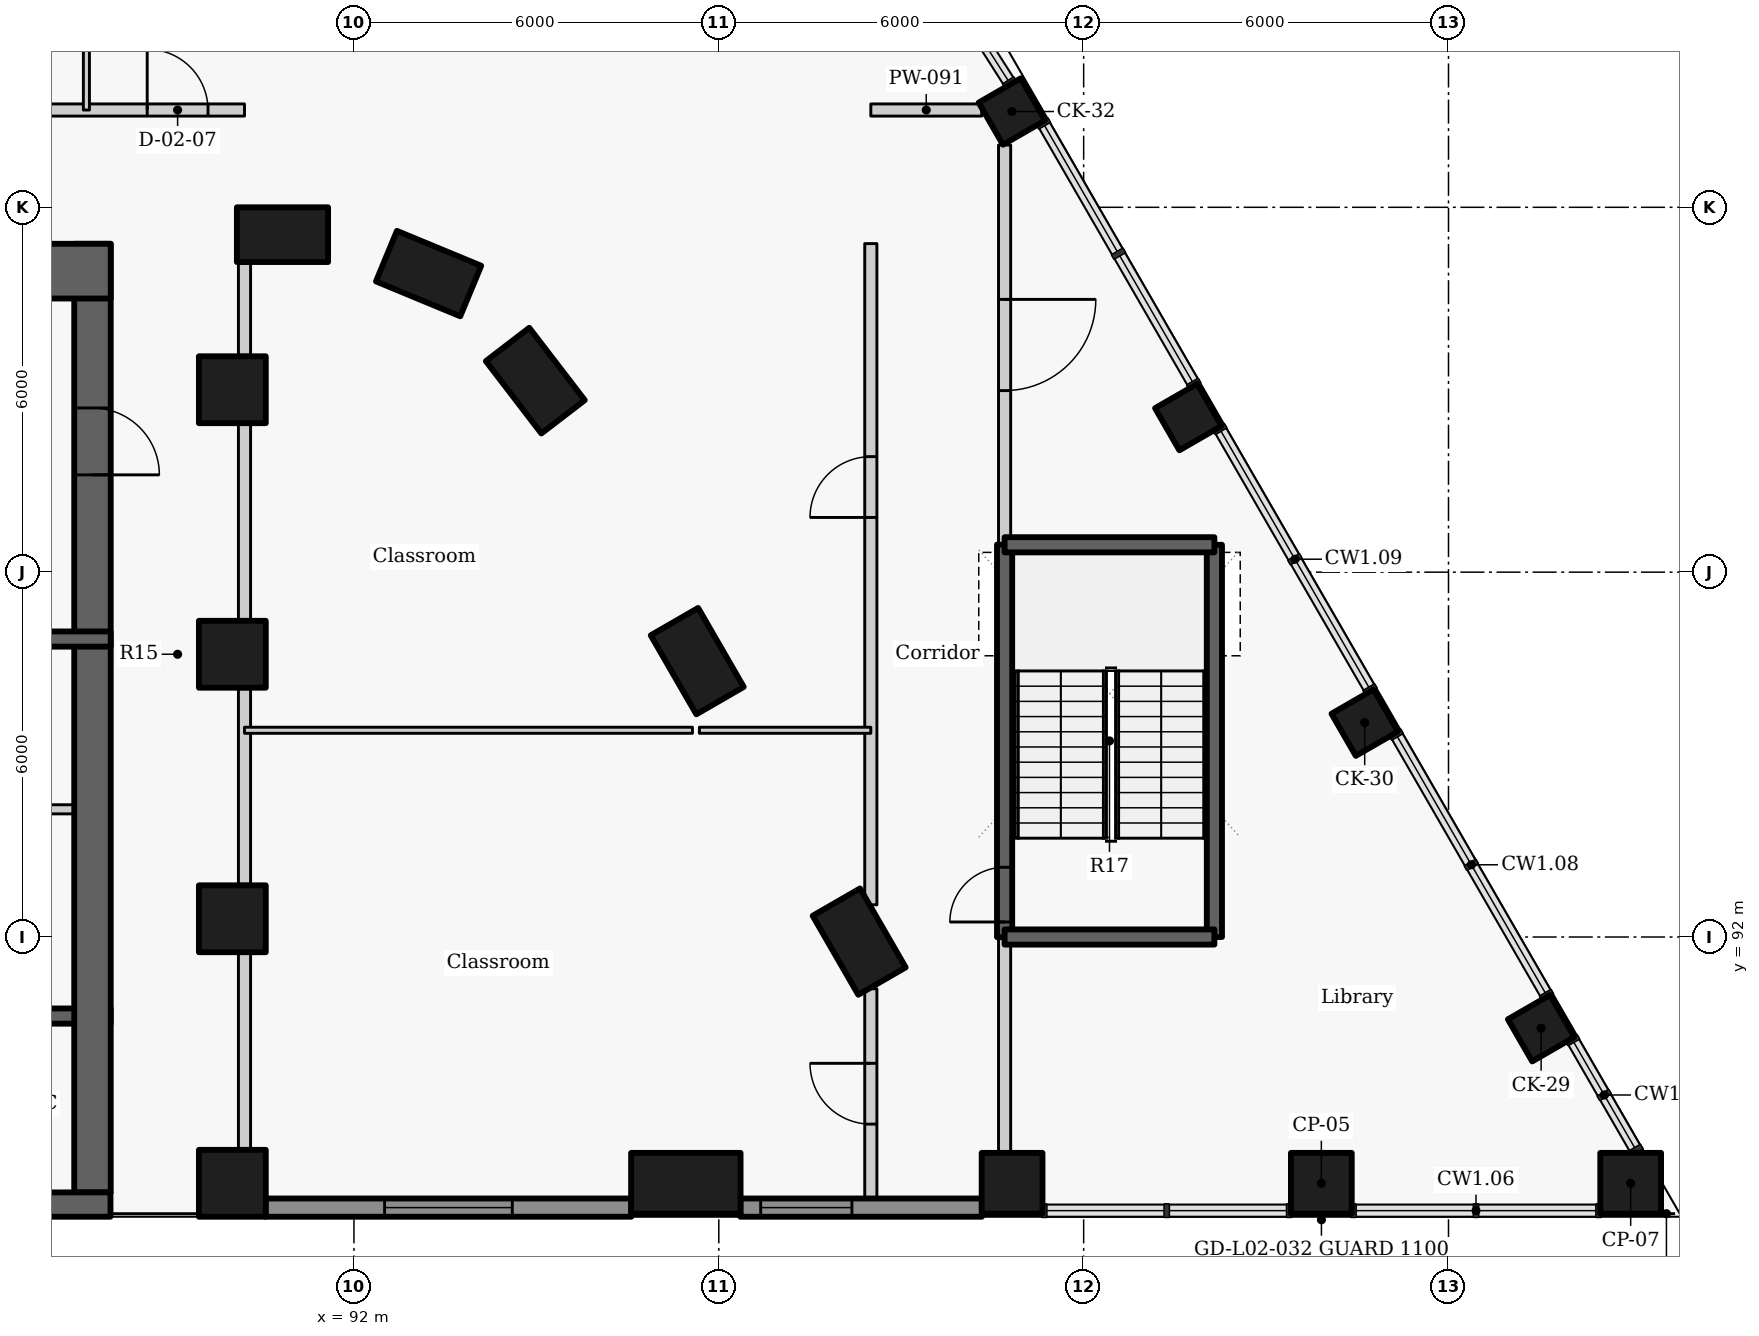
"""IFC4 building model, lengths in metres.
Left out: names, types, materials, properties, quantities, classifications, styles, units other than length and angle.
Written with IfcOpenShell. Run it as: python <this file> out.ifc"""

import sys

from ifc_helpers import new_model, si_unit, direction, frame, frame_2d, origin, origin_2d, place, context, subcontext, project, spatial, rectangle, extrude, element, fill, save


model = new_model("IFC4")
c1 = context("Model", 3, precision=1e-05, world=origin(), true_north=direction((0.0, 1.0)))
c2 = subcontext(c1, "Body", "Model", "MODEL_VIEW")
j1 = project(units=[si_unit("LENGTHUNIT", "METRE"), si_unit("PLANEANGLEUNIT", "RADIAN")], contexts=[c1])
p1 = place(None, origin())
s1 = spatial("IfcSite", under=j1, at=p1, CompositionType="ELEMENT")
p2 = place(p1, origin())
s2 = spatial("IfcBuilding", under=s1, at=p2, CompositionType="ELEMENT")
p3 = place(p2, frame((0.0, 0.0, 11.4)))
s3 = spatial("IfcBuildingStorey", under=s2, at=p3, CompositionType="ELEMENT", Elevation=11.4)
for number, where, z_axis, x_axis in (
    (1, (100.308, 91.925, 0.0), (0.0, 0.0, 1.0), (-0.5, 0.866, 0.0)),
    (2, (97.646, 96.537, 0.0), (0.0, 0.0, 1.0), (-0.5, 0.866, 0.0)),
    (3, (94.982, 101.149, 0.0), (0.0, 0.0, 1.0), (-0.609, 0.793, 0.0)),
    (4, (93.227, 102.91, 0.0), (0.0, 0.0, 1.0), (-0.924, 0.383, 0.0)),
    (5, (90.825, 103.55, 0.0), (0.0, 0.0, 1.0), (-1.0, 0.0, 0.0)),
):
    element("IfcColumn", number, at=place(p3, frame(where, z_axis=z_axis, x_axis=x_axis)), inside=s3, PredefinedType="COLUMN", context=c2, shape_type="SweptSolid", body=[
        extrude(rectangle(XDim=1.5, YDim=0.9, at=origin_2d()), origin(), (0.0, 0.0, 1.0), 4.2),
    ])
for number, where, z_axis, x_axis in (
    (6, (90.0, 87.95, 0.0), (0.0, 0.0, 1.0), (0.0, 1.0, 0.0)),
    (7, (90.0, 92.3, 0.0), (0.0, 0.0, 1.0), (0.0, 1.0, 0.0)),
    (8, (90.0, 96.65, 0.0), (0.0, 0.0, 1.0), (0.0, 1.0, 0.0)),
    (9, (90.0, 101.0, 0.0), (0.0, 0.0, 1.0), (0.0, 1.0, 0.0)),
):
    element("IfcColumn", number, at=place(p3, frame(where, z_axis=z_axis, x_axis=x_axis)), inside=s3, PredefinedType="COLUMN", context=c2, shape_type="SweptSolid", body=[
        extrude(rectangle(XDim=1.1, YDim=1.1, at=origin_2d()), origin(), (0.0, 0.0, 1.0), 4.2),
    ])
for number, where, z_axis, x_axis in (
    (10, (111.523, 90.5, 0.0), (0.0, 0.0, 1.0), (-0.5, 0.866, 0.0)),
    (11, (108.622, 95.525, 0.0), (0.0, 0.0, 1.0), (-0.5, 0.866, 0.0)),
    (12, (105.721, 100.55, 0.0), (0.0, 0.0, 1.0), (-0.5, 0.866, 0.0)),
    (13, (102.82, 105.575, 0.0), (0.0, 0.0, 1.0), (-0.5, 0.866, 0.0)),
):
    element("IfcColumn", number, at=place(p3, frame(where, z_axis=z_axis, x_axis=x_axis)), inside=s3, PredefinedType="COLUMN", context=c2, shape_type="SweptSolid", body=[
        extrude(rectangle(XDim=0.8, YDim=0.8, at=origin_2d()), origin(), (0.0, 0.0, 1.0), 4.2),
    ])
p4 = place(p3, frame((97.458, 87.95, 0.0), z_axis=(0.0, 0.0, 1.0), x_axis=(1.0, 0.0, 0.0)))
e14 = element("IfcColumn", 14, at=p4, inside=s3, PredefinedType="COLUMN", context=c2, shape_type="SweptSolid", body=[
    extrude(rectangle(XDim=1.8, YDim=1.0, at=origin_2d()), origin(), (0.0, 0.0, 1.0), 4.2),
])
for number, where, z_axis, x_axis in (
    (15, (102.823, 87.95, 0.0), (0.0, 0.0, 1.0), (1.0, 0.0, 0.0)),
    (16, (107.909, 87.95, 0.0), (0.0, 0.0, 1.0), (1.0, 0.0, 0.0)),
    (17, (112.996, 87.95, 0.0), (0.0, 0.0, 1.0), (1.0, 0.0, 0.0)),
):
    element("IfcColumn", number, at=place(p3, frame(where, z_axis=z_axis, x_axis=x_axis)), inside=s3, PredefinedType="COLUMN", context=c2, shape_type="SweptSolid", body=[
        extrude(rectangle(XDim=1.0, YDim=1.0, at=origin_2d()), origin(), (0.0, 0.0, 1.0), 4.2),
    ])
p5 = place(p3, frame((90.546, 87.55, 0.0), z_axis=(0.0, 0.0, 1.0), x_axis=(1.0, 0.0, 0.0)))
e18 = element("IfcWall", 18, at=p5, inside=s3, PredefinedType="SOLIDWALL", context=c2, shape_type="SweptSolid", body=[
    extrude(rectangle(XDim=6.016, YDim=0.3, at=frame_2d((3.008, 0.0))), origin(), (0.0, 0.0, 1.0), 3.0),
])
p6 = place(p5, frame((1.958, 0.0, 0.9)))
e19 = element("IfcOpeningElement", 19, at=p6, cuts=e18, PredefinedType="OPENING", context=c2, shape_type="SweptSolid", body=[
    extrude(rectangle(XDim=2.1, YDim=2.05, at=frame_2d((1.05, 1.025))), frame((0.0, 0.16, 0.0), z_axis=(0.0, -1.0, 0.0), x_axis=(1.0, 0.0, 0.0)), (0.0, 0.0, 1.0), 0.32),
])
p7 = place(p3, frame((98.354, 87.55, 0.0), z_axis=(0.0, 0.0, 1.0), x_axis=(1.0, 0.0, 0.0)))
e20 = element("IfcWall", 20, at=p7, inside=s3, PredefinedType="SOLIDWALL", context=c2, shape_type="SweptSolid", body=[
    extrude(rectangle(XDim=3.973, YDim=0.3, at=frame_2d((1.986, 0.0))), origin(), (0.0, 0.0, 1.0), 3.0),
])
p8 = place(p7, frame((0.335, 0.0, 0.9)))
e21 = element("IfcOpeningElement", 21, at=p8, cuts=e20, PredefinedType="OPENING", context=c2, shape_type="SweptSolid", body=[
    extrude(rectangle(XDim=1.5, YDim=2.05, at=frame_2d((0.75, 1.025))), frame((0.0, 0.16, 0.0), z_axis=(0.0, -1.0, 0.0), x_axis=(1.0, 0.0, 0.0)), (0.0, 0.0, 1.0), 0.32),
])
p9 = place(p3, frame((88.0, 90.7, -0.3), z_axis=(0.0, 0.0, 1.0), x_axis=(-1.0, 0.0, 0.0)))
e22 = element("IfcWall", 22, at=p9, inside=s3, PredefinedType="SHEAR", context=c2, shape_type="SweptSolid", body=[
    extrude(rectangle(XDim=2.6, YDim=0.25, at=frame_2d((1.3, 0.0))), origin(), (0.0, 0.0, 1.0), 4.2),
])
p10 = place(p9, frame((1.175, 0.0, 0.3)))
e23 = element("IfcOpeningElement", 23, at=p10, cuts=e22, PredefinedType="OPENING", context=c2, shape_type="SweptSolid", body=[
    extrude(rectangle(XDim=0.9, YDim=2.1, at=frame_2d((0.45, 1.05))), frame((0.0, 0.135, 0.0), z_axis=(0.0, -1.0, 0.0), x_axis=(1.0, 0.0, 0.0)), (0.0, 0.0, 1.0), 0.27),
])
p11 = place(p3, frame((87.7, 103.4, -0.3), z_axis=(0.0, 0.0, 1.0), x_axis=(0.0, -1.0, 0.0)))
e24 = element("IfcWall", 24, at=p11, inside=s3, PredefinedType="SHEAR", context=c2, shape_type="SweptSolid", body=[
    extrude(rectangle(XDim=15.6, YDim=0.6, at=frame_2d((7.8, 0.0))), origin(), (0.0, 0.0, 1.0), 4.2),
])
p12 = place(p11, frame((2.7, 0.0, 0.3)))
e25 = element("IfcOpeningElement", 25, at=p12, cuts=e24, PredefinedType="OPENING", context=c2, shape_type="SweptSolid", body=[
    extrude(rectangle(XDim=1.1, YDim=2.1, at=frame_2d((0.55, 1.05))), frame((0.0, 0.31, 0.0), z_axis=(0.0, -1.0, 0.0), x_axis=(1.0, 0.0, 0.0)), (0.0, 0.0, 1.0), 0.62),
])
p13 = place(p3, frame((85.397, 94.1, 0.0), z_axis=(0.0, 0.0, 1.0), x_axis=(1.0, 0.0, 0.0)))
e26 = element("IfcWall", 26, at=p13, inside=s3, PredefinedType="PARTITIONING", context=c2, shape_type="SweptSolid", body=[
    extrude(rectangle(XDim=2.603, YDim=0.15, at=frame_2d((1.302, 0.0))), origin(), (0.0, 0.0, 1.0), 3.9),
])
p14 = place(p13, frame((0.528, 0.0, 0.0)))
e27 = element("IfcOpeningElement", 27, at=p14, cuts=e26, PredefinedType="OPENING", context=c2, shape_type="SweptSolid", body=[
    extrude(rectangle(XDim=0.9, YDim=2.1, at=frame_2d((0.45, 1.05))), frame((0.0, 0.085, 0.0), z_axis=(0.0, -1.0, 0.0), x_axis=(1.0, 0.0, 0.0)), (0.0, 0.0, 1.0), 0.17),
])
p15 = place(p3, frame((80.0, 96.9, -0.3), z_axis=(0.0, 0.0, 1.0), x_axis=(1.0, 0.0, 0.0)))
e28 = element("IfcWall", 28, at=p15, inside=s3, PredefinedType="SHEAR", context=c2, shape_type="SweptSolid", body=[
    extrude(rectangle(XDim=8.0, YDim=0.25, at=frame_2d((4.0, 0.0))), origin(), (0.0, 0.0, 1.0), 4.2),
])
p16 = place(p15, frame((3.849, 0.0, 0.3)))
e29 = element("IfcOpeningElement", 29, at=p16, cuts=e28, PredefinedType="OPENING", context=c2, shape_type="SweptSolid", body=[
    extrude(rectangle(XDim=1.1, YDim=2.1, at=frame_2d((0.55, 1.05))), frame((0.0, 0.135, 0.0), z_axis=(0.0, -1.0, 0.0), x_axis=(1.0, 0.0, 0.0)), (0.0, 0.0, 1.0), 0.27),
])
p17 = place(p3, frame((83.4, 102.95, -0.3), z_axis=(0.0, 0.0, 1.0), x_axis=(1.0, 0.0, 0.0)))
e30 = element("IfcWall", 30, at=p17, inside=s3, PredefinedType="SHEAR", context=c2, shape_type="SweptSolid", body=[
    extrude(rectangle(XDim=4.6, YDim=0.9, at=frame_2d((2.3, 0.0))), origin(), (0.0, 0.0, 1.0), 4.2),
])
p18 = place(p17, frame((1.748, 0.0, 0.3)))
e31 = element("IfcOpeningElement", 31, at=p18, cuts=e30, PredefinedType="OPENING", context=c2, shape_type="SweptSolid", body=[
    extrude(rectangle(XDim=1.1, YDim=2.1, at=frame_2d((0.55, 1.05))), frame((0.0, 0.46, 0.0), z_axis=(0.0, -1.0, 0.0), x_axis=(1.0, 0.0, 0.0)), (0.0, 0.0, 1.0), 0.92),
])
p19 = place(p3, frame((102.7, 91.997, -0.3), z_axis=(0.0, 0.0, 1.0), x_axis=(0.0, 1.0, 0.0)))
e32 = element("IfcWall", 32, at=p19, inside=s3, PredefinedType="SHEAR", context=c2, shape_type="SweptSolid", body=[
    extrude(rectangle(XDim=6.456, YDim=0.25, at=frame_2d((3.228, 0.0))), origin(), (0.0, 0.0, 1.0), 4.2),
])
p20 = place(p19, frame((0.25, 0.0, 0.3)))
e33 = element("IfcOpeningElement", 33, at=p20, cuts=e32, PredefinedType="OPENING", context=c2, shape_type="SweptSolid", body=[
    extrude(rectangle(XDim=0.9, YDim=2.1, at=frame_2d((0.45, 1.05))), frame((0.0, 0.135, 0.0), z_axis=(0.0, -1.0, 0.0), x_axis=(1.0, 0.0, 0.0)), (0.0, 0.0, 1.0), 0.27),
])
p21 = place(p3, frame((102.7, 88.467, 0.0), z_axis=(0.0, 0.0, 1.0), x_axis=(0.0, 1.0, 0.0)))
e34 = element("IfcWall", 34, at=p21, inside=s3, PredefinedType="PARTITIONING", context=c2, shape_type="SweptSolid", body=[
    extrude(rectangle(XDim=3.536, YDim=0.2, at=frame_2d((1.768, 0.0))), origin(), (0.0, 0.0, 1.0), 3.9),
])
p22 = place(p3, frame((102.7, 105.025, 0.0), z_axis=(0.0, 0.0, 1.0), x_axis=(0.0, -1.0, 0.0)))
e35 = element("IfcWall", 35, at=p22, inside=s3, PredefinedType="PARTITIONING", context=c2, shape_type="SweptSolid", body=[
    extrude(rectangle(XDim=6.578, YDim=0.2, at=frame_2d((3.289, 0.0))), origin(), (0.0, 0.0, 1.0), 3.9),
])
p23 = place(p22, frame((2.539, 0.0, 0.0)))
e36 = element("IfcOpeningElement", 36, at=p23, cuts=e35, PredefinedType="OPENING", context=c2, shape_type="SweptSolid", body=[
    extrude(rectangle(XDim=1.5, YDim=2.1, at=frame_2d((0.75, 1.05))), frame((0.0, 0.11, 0.0), z_axis=(0.0, -1.0, 0.0), x_axis=(1.0, 0.0, 0.0)), (0.0, 0.0, 1.0), 0.22),
])
p24 = place(p3, frame((100.5, 87.7, 0.0), z_axis=(0.0, 0.0, 1.0), x_axis=(0.0, 1.0, 0.0)))
e37 = element("IfcWall", 37, at=p24, inside=s3, PredefinedType="PARTITIONING", context=c2, shape_type="SweptSolid", body=[
    extrude(rectangle(XDim=3.449, YDim=0.2, at=frame_2d((1.725, 0.0))), origin(), (0.0, 0.0, 1.0), 3.13),
])
p25 = place(p24, frame((1.223, 0.0, 0.0)))
e38 = element("IfcOpeningElement", 38, at=p25, cuts=e37, PredefinedType="OPENING", context=c2, shape_type="SweptSolid", body=[
    extrude(rectangle(XDim=1.0, YDim=2.1, at=frame_2d((0.5, 1.05))), frame((0.0, 0.11, 0.0), z_axis=(0.0, -1.0, 0.0), x_axis=(1.0, 0.0, 0.0)), (0.0, 0.0, 1.0), 0.22),
])
p26 = place(p3, frame((100.5, 92.53, 0.0), z_axis=(0.0, 0.0, 1.0), x_axis=(0.0, 1.0, 0.0)))
e39 = element("IfcWall", 39, at=p26, inside=s3, PredefinedType="PARTITIONING", context=c2, shape_type="SweptSolid", body=[
    extrude(rectangle(XDim=10.873, YDim=0.2, at=frame_2d((5.437, 0.0))), origin(), (0.0, 0.0, 1.0), 3.9),
])
p27 = place(p26, frame((6.37, 0.0, 0.0)))
e40 = element("IfcOpeningElement", 40, at=p27, cuts=e39, PredefinedType="OPENING", context=c2, shape_type="SweptSolid", body=[
    extrude(rectangle(XDim=1.0, YDim=2.1, at=frame_2d((0.5, 1.05))), frame((0.0, 0.11, 0.0), z_axis=(0.0, -1.0, 0.0), x_axis=(1.0, 0.0, 0.0)), (0.0, 0.0, 1.0), 0.22),
])
p28 = place(p3, frame((69.8, 105.6, 0.0), z_axis=(0.0, 0.0, 1.0), x_axis=(1.0, 0.0, 0.0)))
e41 = element("IfcWall", 41, at=p28, inside=s3, PredefinedType="PARTITIONING", context=c2, shape_type="SweptSolid", body=[
    extrude(rectangle(XDim=20.4, YDim=0.2, at=frame_2d((10.2, 0.0))), origin(), (0.0, 0.0, 1.0), 3.9),
])
p29 = place(p28, frame((0.602, 0.0, 0.0)))
e42 = element("IfcOpeningElement", 42, at=p29, cuts=e41, PredefinedType="OPENING", context=c2, shape_type="SweptSolid", body=[
    extrude(rectangle(XDim=1.0, YDim=2.1, at=frame_2d((0.5, 1.05))), frame((0.0, 0.11, 0.0), z_axis=(0.0, -1.0, 0.0), x_axis=(1.0, 0.0, 0.0)), (0.0, 0.0, 1.0), 0.22),
])
p30 = place(p28, frame((18.8, 0.0, 0.0)))
e43 = element("IfcOpeningElement", 43, at=p30, cuts=e41, PredefinedType="OPENING", context=c2, shape_type="SweptSolid", body=[
    extrude(rectangle(XDim=1.0, YDim=2.1, at=frame_2d((0.5, 1.05))), frame((0.0, 0.11, 0.0), z_axis=(0.0, -1.0, 0.0), x_axis=(1.0, 0.0, 0.0)), (0.0, 0.0, 1.0), 0.22),
])
p31 = place(p28, frame((10.3, 0.0, 0.0)))
e44 = element("IfcOpeningElement", 44, at=p31, cuts=e41, PredefinedType="OPENING", context=c2, shape_type="SweptSolid", body=[
    extrude(rectangle(XDim=1.0, YDim=2.1, at=frame_2d((0.5, 1.05))), frame((0.0, 0.11, 0.0), z_axis=(0.0, -1.0, 0.0), x_axis=(1.0, 0.0, 0.0)), (0.0, 0.0, 1.0), 0.22),
])
p32 = place(p3, frame((100.5, 105.6, 0.0), z_axis=(0.0, 0.0, 1.0), x_axis=(1.0, 0.0, 0.0)))
e45 = element("IfcWall", 45, at=p32, inside=s3, PredefinedType="PARTITIONING", context=c2, shape_type="SweptSolid", body=[
    extrude(rectangle(XDim=1.823, YDim=0.2, at=frame_2d((0.912, 0.0))), origin(), (0.0, 0.0, 1.0), 3.9),
])
p33 = place(p3, frame((90.2, 88.517, 0.0), z_axis=(0.0, 0.0, 1.0), x_axis=(0.0, 1.0, 0.0)))
e46 = element("IfcWall", 46, at=p33, inside=s3, PredefinedType="PARTITIONING", context=c2, shape_type="SweptSolid", body=[
    extrude(rectangle(XDim=3.216, YDim=0.2, at=frame_2d((1.608, 0.0))), origin(), (0.0, 0.0, 1.0), 3.13),
])
for number, where, z_axis, x_axis in (
    (47, (90.2, 92.867, 0.0), (0.0, 0.0, 1.0), (0.0, 1.0, 0.0)),
    (48, (90.2, 97.217, 0.0), (0.0, 0.0, 1.0), (0.0, 1.0, 0.0)),
):
    element("IfcWall", number, at=place(p3, frame(where, z_axis=z_axis, x_axis=x_axis)), inside=s3, PredefinedType="PARTITIONING", context=c2, shape_type="SweptSolid", body=[
        extrude(rectangle(XDim=3.216, YDim=0.2, at=frame_2d((1.608, 0.0))), origin(), (0.0, 0.0, 1.0), 3.13),
    ])
p34 = place(p3, frame((90.2, 101.567, 0.0), z_axis=(0.0, 0.0, 1.0), x_axis=(0.0, 1.0, 0.0)))
e49 = element("IfcWall", 49, at=p34, inside=s3, PredefinedType="PARTITIONING", context=c2, shape_type="SweptSolid", body=[
    extrude(rectangle(XDim=1.516, YDim=0.2, at=frame_2d((0.758, 0.0))), origin(), (0.0, 0.0, 1.0), 3.9),
])
p35 = place(p3, frame((106.15, 92.0, -0.3), z_axis=(0.0, 0.0, 1.0), x_axis=(0.0, 1.0, 0.0)))
e50 = element("IfcWall", 50, at=p35, inside=s3, PredefinedType="SHEAR", context=c2, shape_type="SweptSolid", body=[
    extrude(rectangle(XDim=6.45, YDim=0.25, at=frame_2d((3.225, 0.0))), origin(), (0.0, 0.0, 1.0), 4.2),
])
for number, where, z_axis, x_axis in (
    (51, (102.7, 98.45, -0.3), (0.0, 0.0, 1.0), (1.0, 0.0, 0.0)),
    (52, (102.7, 92.0, -0.3), (0.0, 0.0, 1.0), (1.0, 0.0, 0.0)),
):
    element("IfcWall", number, at=place(p3, frame(where, z_axis=z_axis, x_axis=x_axis)), inside=s3, PredefinedType="SHEAR", context=c2, shape_type="SweptSolid", body=[
        extrude(rectangle(XDim=3.45, YDim=0.25, at=frame_2d((1.725, 0.0))), origin(), (0.0, 0.0, 1.0), 4.2),
    ])
p36 = place(p3, frame((90.2, 95.4, 0.0), z_axis=(0.0, 0.0, 1.0), x_axis=(1.0, 0.0, 0.0)))
e53 = element("IfcWall", 53, at=p36, inside=s3, PredefinedType="PARTITIONING", context=c2, shape_type="SweptSolid", body=[
    extrude(rectangle(XDim=7.366, YDim=0.1, at=frame_2d((3.683, 0.0))), origin(), (0.0, 0.0, 1.0), 3.9),
])
p37 = place(p3, frame((97.68, 95.4, 0.0), z_axis=(0.0, 0.0, 1.0), x_axis=(1.0, 0.0, 0.0)))
e54 = element("IfcWall", 54, at=p37, inside=s3, PredefinedType="PARTITIONING", context=c2, shape_type="SweptSolid", body=[
    extrude(rectangle(XDim=2.82, YDim=0.1, at=frame_2d((1.41, 0.0))), origin(), (0.0, 0.0, 1.0), 2.98),
])
p38 = place(p3, frame((87.6, 105.6, 0.0), z_axis=(0.0, 0.0, 1.0), x_axis=(0.0, 1.0, 0.0)))
e55 = element("IfcWall", 55, at=p38, inside=s3, PredefinedType="PARTITIONING", context=c2, shape_type="SweptSolid", body=[
    extrude(rectangle(XDim=7.1, YDim=0.1, at=frame_2d((3.55, 0.0))), origin(), (0.0, 0.0, 1.0), 3.13),
])
p39 = place(p3, frame((72.004, 87.6, -0.3), z_axis=(0.0, 0.0, 1.0), x_axis=(1.0, 0.0, 0.0)))
e56 = element("IfcWall", 56, at=p39, inside=s3, PredefinedType="SHEAR", context=c2, shape_type="SweptSolid", body=[
    extrude(rectangle(XDim=15.992, YDim=0.4, at=frame_2d((7.996, 0.0))), origin(), (0.0, 0.0, 1.0), 4.2),
])
p40 = place(p6, origin())
e57 = element("IfcWindow", 57, at=p40, inside=s3, PartitioningType="SINGLE_PANEL", PredefinedType="WINDOW", context=c2, shape_type="SweptSolid", body=[
    extrude(rectangle(XDim=2.1, YDim=2.05, at=frame_2d((1.05, 1.025))), frame((0.0, 0.03, 0.0), z_axis=(0.0, -1.0, 0.0), x_axis=(1.0, 0.0, 0.0)), (0.0, 0.0, 1.0), 0.06),
])
fill(e19, e57)
p41 = place(p8, origin())
e58 = element("IfcWindow", 58, at=p41, inside=s3, PartitioningType="SINGLE_PANEL", PredefinedType="WINDOW", context=c2, shape_type="SweptSolid", body=[
    extrude(rectangle(XDim=1.5, YDim=2.05, at=frame_2d((0.75, 1.025))), frame((0.0, 0.03, 0.0), z_axis=(0.0, -1.0, 0.0), x_axis=(1.0, 0.0, 0.0)), (0.0, 0.0, 1.0), 0.06),
])
fill(e21, e58)
p42 = place(p20, origin())
e59 = element("IfcDoor", 59, at=p42, inside=s3, OperationType="SINGLE_SWING_LEFT", PredefinedType="DOOR", context=c2, shape_type="SweptSolid", body=[
    extrude(rectangle(XDim=0.9, YDim=2.1, at=frame_2d((0.45, 1.05))), frame((0.0, 0.025, 0.0), z_axis=(0.0, -1.0, 0.0), x_axis=(1.0, 0.0, 0.0)), (0.0, 0.0, 1.0), 0.05),
])
fill(e33, e59)
p43 = place(p23, origin())
e60 = element("IfcDoor", 60, at=p43, inside=s3, OperationType="DOUBLE_DOOR_SINGLE_SWING", PredefinedType="DOOR", context=c2, shape_type="SweptSolid", body=[
    extrude(rectangle(XDim=1.5, YDim=2.1, at=frame_2d((0.75, 1.05))), frame((0.0, 0.025, 0.0), z_axis=(0.0, -1.0, 0.0), x_axis=(1.0, 0.0, 0.0)), (0.0, 0.0, 1.0), 0.05),
])
fill(e36, e60)
p44 = place(p25, origin())
e61 = element("IfcDoor", 61, at=p44, inside=s3, OperationType="SINGLE_SWING_RIGHT", PredefinedType="DOOR", context=c2, shape_type="SweptSolid", body=[
    extrude(rectangle(XDim=1.0, YDim=2.1, at=frame_2d((0.5, 1.05))), frame((0.0, 0.025, 0.0), z_axis=(0.0, -1.0, 0.0), x_axis=(1.0, 0.0, 0.0)), (0.0, 0.0, 1.0), 0.05),
])
fill(e38, e61)
p45 = place(p27, origin())
e62 = element("IfcDoor", 62, at=p45, inside=s3, OperationType="SINGLE_SWING_LEFT", PredefinedType="DOOR", context=c2, shape_type="SweptSolid", body=[
    extrude(rectangle(XDim=1.0, YDim=2.1, at=frame_2d((0.5, 1.05))), frame((0.0, 0.025, 0.0), z_axis=(0.0, -1.0, 0.0), x_axis=(1.0, 0.0, 0.0)), (0.0, 0.0, 1.0), 0.05),
])
fill(e40, e62)
p46 = place(p30, origin())
e63 = element("IfcDoor", 63, at=p46, inside=s3, OperationType="SINGLE_SWING_LEFT", PredefinedType="DOOR", context=c2, shape_type="SweptSolid", body=[
    extrude(rectangle(XDim=1.0, YDim=2.1, at=frame_2d((0.5, 1.05))), frame((0.0, 0.025, 0.0), z_axis=(0.0, -1.0, 0.0), x_axis=(1.0, 0.0, 0.0)), (0.0, 0.0, 1.0), 0.05),
])
fill(e43, e63)
p47 = place(p12, origin())
e64 = element("IfcDoor", 64, at=p47, inside=s3, OperationType="SINGLE_SWING_RIGHT", PredefinedType="DOOR", context=c2, shape_type="SweptSolid", body=[
    extrude(rectangle(XDim=1.1, YDim=2.1, at=frame_2d((0.55, 1.05))), frame((0.0, 0.025, 0.0), z_axis=(0.0, -1.0, 0.0), x_axis=(1.0, 0.0, 0.0)), (0.0, 0.0, 1.0), 0.05),
])
fill(e25, e64)
save(model, sys.argv[1])
